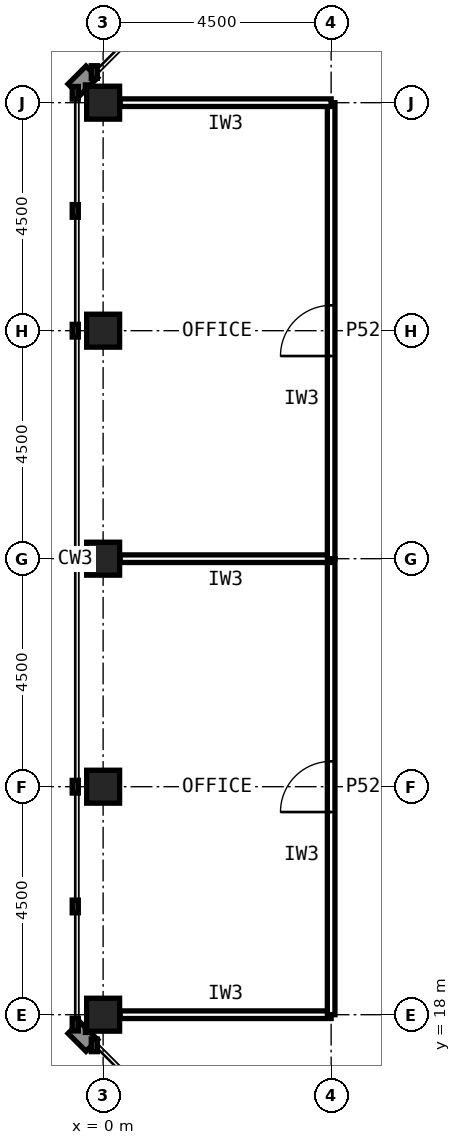
"""IFC4 building model, lengths in metres.
Left out: names, types, materials, properties, quantities, classifications, styles, units other than length and angle.
Written with IfcOpenShell. Run it as: python <this file> out.ifc"""

import sys

from ifc_helpers import new_model, si_unit, direction, frame, frame_2d, origin, origin_2d, place, context, subcontext, project, spatial, rectangle, hollow_rectangle, extrude, element, fill, save


model = new_model("IFC4")
c1 = context("Model", 3, precision=1e-05, world=origin(), true_north=direction((0.0, 1.0)))
c2 = subcontext(c1, "Body", "Model", "MODEL_VIEW")
j1 = project(units=[si_unit("LENGTHUNIT", "METRE"), si_unit("PLANEANGLEUNIT", "RADIAN")], contexts=[c1])
p1 = place(None, origin())
s1 = spatial("IfcSite", under=j1, at=p1, CompositionType="ELEMENT")
p2 = place(p1, origin())
s2 = spatial("IfcBuilding", under=s1, at=p2, CompositionType="ELEMENT")
p3 = place(p2, frame((0.0, 0.0, 222.6)))
s3 = spatial("IfcBuildingStorey", under=s2, at=p3, CompositionType="ELEMENT", Elevation=222.6)
for number, where, z_axis, x_axis in (
    (1, (0.0, 36.0, 0.0), (0.0, 0.0, 1.0), (1.0, 0.0, 0.0)),
    (2, (0.0, 31.5, 0.0), (0.0, 0.0, 1.0), (1.0, 0.0, 0.0)),
    (3, (0.0, 27.0, 0.0), (0.0, 0.0, 1.0), (1.0, 0.0, 0.0)),
    (4, (0.0, 22.5, 0.0), (0.0, 0.0, 1.0), (1.0, 0.0, 0.0)),
    (5, (0.0, 18.0, 0.0), (0.0, 0.0, 1.0), (1.0, 0.0, 0.0)),
):
    element("IfcColumn", number, at=place(p3, frame(where, z_axis=z_axis, x_axis=x_axis)), inside=s3, PredefinedType="COLUMN", context=c2, shape_type="SweptSolid", body=[
        extrude(hollow_rectangle(XDim=0.65, YDim=0.65, WallThickness=0.032, at=origin_2d()), origin(), (0.0, 0.0, 1.0), 4.0),
    ])
p4 = place(p3, frame((0.335, 18.0, 0.0), z_axis=(0.0, 0.0, 1.0), x_axis=(1.0, 0.0, 0.0)))
e6 = element("IfcWall", 6, at=p4, inside=s3, PredefinedType="PARTITIONING", context=c2, shape_type="SweptSolid", body=[
    extrude(rectangle(XDim=4.165, YDim=0.15, at=frame_2d((2.083, 0.0))), origin(), (0.0, 0.0, 1.0), 2.989),
])
p5 = place(p3, frame((4.5, 18.0, 0.0), z_axis=(0.0, 0.0, 1.0), x_axis=(0.0, 1.0, 0.0)))
e7 = element("IfcWall", 7, at=p5, inside=s3, PredefinedType="PARTITIONING", context=c2, shape_type="SweptSolid", body=[
    extrude(rectangle(XDim=9.0, YDim=0.15, at=frame_2d((4.5, 0.0))), origin(), (0.0, 0.0, 1.0), 3.84),
])
p6 = place(p5, frame((4.0, 0.0, 0.0)))
e8 = element("IfcOpeningElement", 8, at=p6, cuts=e7, PredefinedType="OPENING", context=c2, shape_type="SweptSolid", body=[
    extrude(rectangle(XDim=1.0, YDim=2.1, at=frame_2d((0.5, 1.05))), frame((0.0, 0.085, 0.0), z_axis=(0.0, -1.0, 0.0), x_axis=(1.0, 0.0, 0.0)), (0.0, 0.0, 1.0), 0.17),
])
p7 = place(p3, frame((4.5, 27.0, 0.0), z_axis=(0.0, 0.0, 1.0), x_axis=(-1.0, 0.0, 0.0)))
e9 = element("IfcWall", 9, at=p7, inside=s3, PredefinedType="PARTITIONING", context=c2, shape_type="SweptSolid", body=[
    extrude(rectangle(XDim=4.165, YDim=0.15, at=frame_2d((2.083, 0.0))), origin(), (0.0, 0.0, 1.0), 2.989),
])
p8 = place(p3, frame((4.5, 27.0, 0.0), z_axis=(0.0, 0.0, 1.0), x_axis=(0.0, 1.0, 0.0)))
e10 = element("IfcWall", 10, at=p8, inside=s3, PredefinedType="PARTITIONING", context=c2, shape_type="SweptSolid", body=[
    extrude(rectangle(XDim=9.0, YDim=0.15, at=frame_2d((4.5, 0.0))), origin(), (0.0, 0.0, 1.0), 3.84),
])
p9 = place(p8, frame((4.0, 0.0, 0.0)))
e11 = element("IfcOpeningElement", 11, at=p9, cuts=e10, PredefinedType="OPENING", context=c2, shape_type="SweptSolid", body=[
    extrude(rectangle(XDim=1.0, YDim=2.1, at=frame_2d((0.5, 1.05))), frame((0.0, 0.085, 0.0), z_axis=(0.0, -1.0, 0.0), x_axis=(1.0, 0.0, 0.0)), (0.0, 0.0, 1.0), 0.17),
])
p10 = place(p3, frame((4.5, 36.0, 0.0), z_axis=(0.0, 0.0, 1.0), x_axis=(-1.0, 0.0, 0.0)))
e12 = element("IfcWall", 12, at=p10, inside=s3, PredefinedType="PARTITIONING", context=c2, shape_type="SweptSolid", body=[
    extrude(rectangle(XDim=4.165, YDim=0.15, at=frame_2d((2.083, 0.0))), origin(), (0.0, 0.0, 1.0), 2.989),
])
p11 = place(p6, origin())
e13 = element("IfcDoor", 13, at=p11, inside=s3, OperationType="SINGLE_SWING_LEFT", PredefinedType="DOOR", context=c2, shape_type="SweptSolid", body=[
    extrude(rectangle(XDim=1.0, YDim=2.1, at=frame_2d((0.5, 1.05))), frame((0.0, 0.025, 0.0), z_axis=(0.0, -1.0, 0.0), x_axis=(1.0, 0.0, 0.0)), (0.0, 0.0, 1.0), 0.05),
])
fill(e8, e13)
p12 = place(p9, origin())
e14 = element("IfcDoor", 14, at=p12, inside=s3, OperationType="SINGLE_SWING_LEFT", PredefinedType="DOOR", context=c2, shape_type="SweptSolid", body=[
    extrude(rectangle(XDim=1.0, YDim=2.1, at=frame_2d((0.5, 1.05))), frame((0.0, 0.025, 0.0), z_axis=(0.0, -1.0, 0.0), x_axis=(1.0, 0.0, 0.0)), (0.0, 0.0, 1.0), 0.05),
])
fill(e11, e14)
save(model, sys.argv[1])
